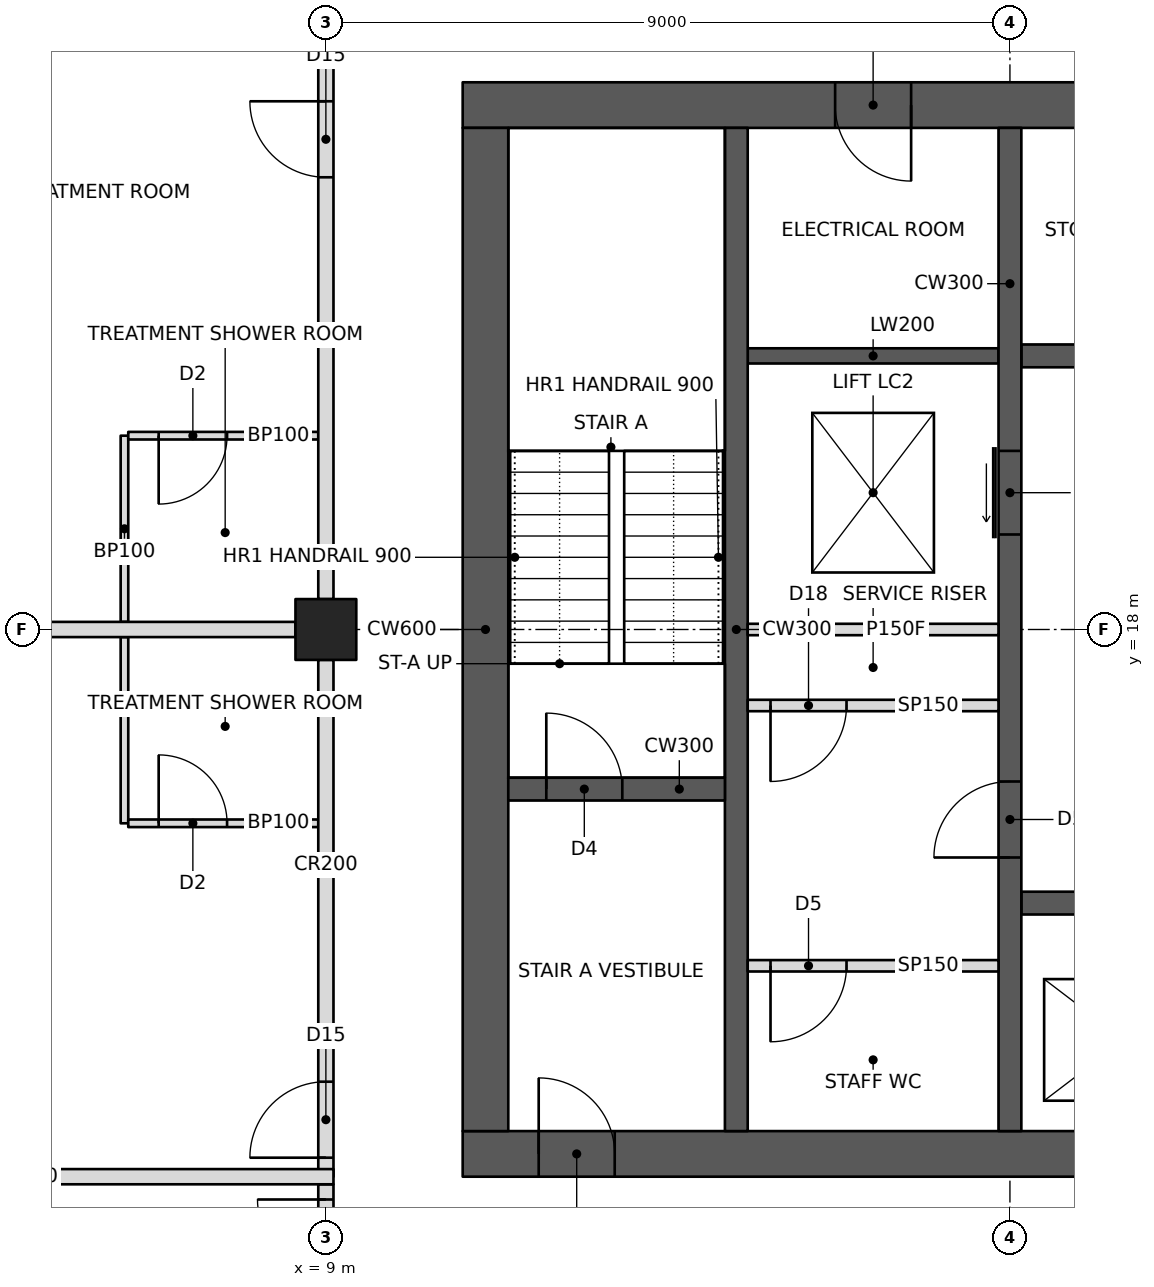
"""IFC4 building model, lengths in metres.
Left out: names, types, materials, properties, quantities, classifications, styles, units other than length and angle.
Written with IfcOpenShell. Run it as: python <this file> out.ifc"""

import sys

from ifc_helpers import new_model, si_unit, direction, frame, frame_2d, origin, origin_2d, place, context, subcontext, project, spatial, rectangle, hollow_rectangle, extrude, element, fill, save


model = new_model("IFC4")
c1 = context("Model", 3, precision=1e-05, world=origin(), true_north=direction((0.0, 1.0)))
c2 = subcontext(c1, "Body", "Model", "MODEL_VIEW")
j1 = project(units=[si_unit("LENGTHUNIT", "METRE"), si_unit("PLANEANGLEUNIT", "RADIAN")], contexts=[c1])
p1 = place(None, origin())
s1 = spatial("IfcSite", under=j1, at=p1, CompositionType="ELEMENT")
p2 = place(p1, origin())
s2 = spatial("IfcBuilding", under=s1, at=p2, CompositionType="ELEMENT")
p3 = place(p2, frame((0.0, 0.0, 266.2)))
s3 = spatial("IfcBuildingStorey", under=s2, at=p3, CompositionType="ELEMENT", Elevation=266.2)
p4 = place(p3, frame((9.0, 18.0, 0.0), z_axis=(0.0, 0.0, 1.0), x_axis=(1.0, 0.0, 0.0)))
e1 = element("IfcColumn", 1, at=p4, inside=s3, PredefinedType="COLUMN", context=c2, shape_type="SweptSolid", body=[
    extrude(hollow_rectangle(XDim=0.8, YDim=0.8, WallThickness=0.032, at=origin_2d()), origin(), (0.0, 0.0, 1.0), 3.6),
])
p5 = place(p3, frame((10.8, 11.1, 0.0), z_axis=(0.0, 0.0, 1.0), x_axis=(1.0, 0.0, 0.0)))
e2 = element("IfcWall", 2, at=p5, inside=s3, PredefinedType="SHEAR", context=c2, shape_type="SweptSolid", body=[
    extrude(rectangle(XDim=23.4, YDim=0.6, at=frame_2d((11.7, 0.0))), origin(), (0.0, 0.0, 1.0), 3.6),
])
p6 = place(p5, frame((1.0, 0.0, 0.0)))
e3 = element("IfcOpeningElement", 3, at=p6, cuts=e2, PredefinedType="OPENING", context=c2, shape_type="SweptSolid", body=[
    extrude(rectangle(XDim=1.0, YDim=2.1, at=frame_2d((0.5, 1.05))), frame((0.0, 0.31, 0.0), z_axis=(0.0, -1.0, 0.0), x_axis=(1.0, 0.0, 0.0)), (0.0, 0.0, 1.0), 0.62),
])
p7 = place(p5, frame((17.2, 0.0, 0.0)))
e4 = element("IfcOpeningElement", 4, at=p7, cuts=e2, PredefinedType="OPENING", context=c2, shape_type="SweptSolid", body=[
    extrude(rectangle(XDim=1.8, YDim=2.1, at=frame_2d((0.9, 1.05))), frame((0.0, 0.31, 0.0), z_axis=(0.0, -1.0, 0.0), x_axis=(1.0, 0.0, 0.0)), (0.0, 0.0, 1.0), 0.62),
])
p8 = place(p3, frame((10.8, 24.9, 0.0), z_axis=(0.0, 0.0, 1.0), x_axis=(1.0, 0.0, 0.0)))
e5 = element("IfcWall", 5, at=p8, inside=s3, PredefinedType="SHEAR", context=c2, shape_type="SweptSolid", body=[
    extrude(rectangle(XDim=23.4, YDim=0.6, at=frame_2d((11.7, 0.0))), origin(), (0.0, 0.0, 1.0), 3.6),
])
p9 = place(p8, frame((17.2, 0.0, 0.0)))
e6 = element("IfcOpeningElement", 6, at=p9, cuts=e5, PredefinedType="OPENING", context=c2, shape_type="SweptSolid", body=[
    extrude(rectangle(XDim=1.8, YDim=2.1, at=frame_2d((0.9, 1.05))), frame((0.0, 0.31, 0.0), z_axis=(0.0, -1.0, 0.0), x_axis=(1.0, 0.0, 0.0)), (0.0, 0.0, 1.0), 0.62),
])
p10 = place(p8, frame((21.1, 0.0, 0.0)))
e7 = element("IfcOpeningElement", 7, at=p10, cuts=e5, PredefinedType="OPENING", context=c2, shape_type="SweptSolid", body=[
    extrude(rectangle(XDim=1.0, YDim=2.1, at=frame_2d((0.5, 1.05))), frame((0.0, 0.31, 0.0), z_axis=(0.0, -1.0, 0.0), x_axis=(1.0, 0.0, 0.0)), (0.0, 0.0, 1.0), 0.62),
])
p11 = place(p8, frame((4.9, 0.0, 0.0)))
e8 = element("IfcOpeningElement", 8, at=p11, cuts=e5, PredefinedType="OPENING", context=c2, shape_type="SweptSolid", body=[
    extrude(rectangle(XDim=1.0, YDim=2.1, at=frame_2d((0.5, 1.05))), frame((0.0, 0.31, 0.0), z_axis=(0.0, -1.0, 0.0), x_axis=(1.0, 0.0, 0.0)), (0.0, 0.0, 1.0), 0.62),
])
p12 = place(p3, frame((11.1, 11.4, 0.0), z_axis=(0.0, 0.0, 1.0), x_axis=(0.0, 1.0, 0.0)))
e9 = element("IfcWall", 9, at=p12, inside=s3, PredefinedType="SHEAR", context=c2, shape_type="SweptSolid", body=[
    extrude(rectangle(XDim=13.2, YDim=0.6, at=frame_2d((6.6, 0.0))), origin(), (0.0, 0.0, 1.0), 3.6),
])
p13 = place(p3, frame((14.4, 11.4, 0.0), z_axis=(0.0, 0.0, 1.0), x_axis=(0.0, 1.0, 0.0)))
e10 = element("IfcWall", 10, at=p13, inside=s3, PredefinedType="SHEAR", context=c2, shape_type="SweptSolid", body=[
    extrude(rectangle(XDim=13.2, YDim=0.3, at=frame_2d((6.6, 0.0))), origin(), (0.0, 0.0, 1.0), 3.6),
])
p14 = place(p3, frame((11.4, 15.9, 0.0), z_axis=(0.0, 0.0, 1.0), x_axis=(1.0, 0.0, 0.0)))
e11 = element("IfcWall", 11, at=p14, inside=s3, PredefinedType="SHEAR", context=c2, shape_type="SweptSolid", body=[
    extrude(rectangle(XDim=2.85, YDim=0.3, at=frame_2d((1.425, 0.0))), origin(), (0.0, 0.0, 1.0), 3.6),
])
p15 = place(p14, frame((0.5, 0.0, 0.0)))
e12 = element("IfcOpeningElement", 12, at=p15, cuts=e11, PredefinedType="OPENING", context=c2, shape_type="SweptSolid", body=[
    extrude(rectangle(XDim=1.0, YDim=2.1, at=frame_2d((0.5, 1.05))), frame((0.0, 0.16, 0.0), z_axis=(0.0, -1.0, 0.0), x_axis=(1.0, 0.0, 0.0)), (0.0, 0.0, 1.0), 0.32),
])
p16 = place(p3, frame((18.0, 11.4, 0.0), z_axis=(0.0, 0.0, 1.0), x_axis=(0.0, 1.0, 0.0)))
e13 = element("IfcWall", 13, at=p16, inside=s3, PredefinedType="SHEAR", context=c2, shape_type="SweptSolid", body=[
    extrude(rectangle(XDim=13.2, YDim=0.3, at=frame_2d((6.6, 0.0))), origin(), (0.0, 0.0, 1.0), 3.6),
])
p17 = place(p16, frame((3.6, 0.0, 0.0)))
e14 = element("IfcOpeningElement", 14, at=p17, cuts=e13, PredefinedType="OPENING", context=c2, shape_type="SweptSolid", body=[
    extrude(rectangle(XDim=1.0, YDim=2.1, at=frame_2d((0.5, 1.05))), frame((0.0, 0.16, 0.0), z_axis=(0.0, -1.0, 0.0), x_axis=(1.0, 0.0, 0.0)), (0.0, 0.0, 1.0), 0.32),
])
p18 = place(p16, frame((7.85, 0.0, 0.0)))
e15 = element("IfcOpeningElement", 15, at=p18, cuts=e13, PredefinedType="OPENING", context=c2, shape_type="SweptSolid", body=[
    extrude(rectangle(XDim=1.1, YDim=2.1, at=frame_2d((0.55, 1.05))), frame((0.0, 0.16, 0.0), z_axis=(0.0, -1.0, 0.0), x_axis=(1.0, 0.0, 0.0)), (0.0, 0.0, 1.0), 0.32),
])
p19 = place(p3, frame((14.55, 18.0, 0.0), z_axis=(0.0, 0.0, 1.0), x_axis=(1.0, 0.0, 0.0)))
e16 = element("IfcWall", 16, at=p19, inside=s3, PredefinedType="PARTITIONING", context=c2, shape_type="SweptSolid", body=[
    extrude(rectangle(XDim=3.3, YDim=0.15, at=frame_2d((1.65, 0.0))), origin(), (0.0, 0.0, 1.0), 3.35),
])
p20 = place(p3, frame((18.15, 14.4, 0.0), z_axis=(0.0, 0.0, 1.0), x_axis=(1.0, 0.0, 0.0)))
e17 = element("IfcWall", 17, at=p20, inside=s3, PredefinedType="SHEAR", context=c2, shape_type="SweptSolid", body=[
    extrude(rectangle(XDim=9.0, YDim=0.3, at=frame_2d((4.5, 0.0))), origin(), (0.0, 0.0, 1.0), 3.6),
])
p21 = place(p20, frame((0.8, 0.0, 0.0)))
e18 = element("IfcOpeningElement", 18, at=p21, cuts=e17, PredefinedType="OPENING", context=c2, shape_type="SweptSolid", body=[
    extrude(rectangle(XDim=1.1, YDim=2.1, at=frame_2d((0.55, 1.05))), frame((0.0, 0.16, 0.0), z_axis=(0.0, -1.0, 0.0), x_axis=(1.0, 0.0, 0.0)), (0.0, 0.0, 1.0), 0.32),
])
p22 = place(p20, frame((6.75, 0.0, 0.0)))
e19 = element("IfcOpeningElement", 19, at=p22, cuts=e17, PredefinedType="OPENING", context=c2, shape_type="SweptSolid", body=[
    extrude(rectangle(XDim=1.2, YDim=2.1, at=frame_2d((0.6, 1.05))), frame((0.0, 0.16, 0.0), z_axis=(0.0, -1.0, 0.0), x_axis=(1.0, 0.0, 0.0)), (0.0, 0.0, 1.0), 0.32),
])
p23 = place(p20, frame((3.8, 0.0, 0.0)))
e20 = element("IfcOpeningElement", 20, at=p23, cuts=e17, PredefinedType="OPENING", context=c2, shape_type="SweptSolid", body=[
    extrude(rectangle(XDim=1.1, YDim=2.1, at=frame_2d((0.55, 1.05))), frame((0.0, 0.16, 0.0), z_axis=(0.0, -1.0, 0.0), x_axis=(1.0, 0.0, 0.0)), (0.0, 0.0, 1.0), 0.32),
])
p24 = place(p3, frame((18.15, 21.6, 0.0), z_axis=(0.0, 0.0, 1.0), x_axis=(1.0, 0.0, 0.0)))
e21 = element("IfcWall", 21, at=p24, inside=s3, PredefinedType="SHEAR", context=c2, shape_type="SweptSolid", body=[
    extrude(rectangle(XDim=9.0, YDim=0.3, at=frame_2d((4.5, 0.0))), origin(), (0.0, 0.0, 1.0), 3.6),
])
p25 = place(p24, frame((6.75, 0.0, 0.0)))
e22 = element("IfcOpeningElement", 22, at=p25, cuts=e21, PredefinedType="OPENING", context=c2, shape_type="SweptSolid", body=[
    extrude(rectangle(XDim=1.2, YDim=2.1, at=frame_2d((0.6, 1.05))), frame((0.0, 0.16, 0.0), z_axis=(0.0, -1.0, 0.0), x_axis=(1.0, 0.0, 0.0)), (0.0, 0.0, 1.0), 0.32),
])
p26 = place(p24, frame((0.8, 0.0, 0.0)))
e23 = element("IfcOpeningElement", 23, at=p26, cuts=e21, PredefinedType="OPENING", context=c2, shape_type="SweptSolid", body=[
    extrude(rectangle(XDim=1.1, YDim=2.1, at=frame_2d((0.55, 1.05))), frame((0.0, 0.16, 0.0), z_axis=(0.0, -1.0, 0.0), x_axis=(1.0, 0.0, 0.0)), (0.0, 0.0, 1.0), 0.32),
])
p27 = place(p24, frame((3.8, 0.0, 0.0)))
e24 = element("IfcOpeningElement", 24, at=p27, cuts=e21, PredefinedType="OPENING", context=c2, shape_type="SweptSolid", body=[
    extrude(rectangle(XDim=1.1, YDim=2.1, at=frame_2d((0.55, 1.05))), frame((0.0, 0.16, 0.0), z_axis=(0.0, -1.0, 0.0), x_axis=(1.0, 0.0, 0.0)), (0.0, 0.0, 1.0), 0.32),
])
p28 = place(p3, frame((14.55, 21.6, 0.0), z_axis=(0.0, 0.0, 1.0), x_axis=(1.0, 0.0, 0.0)))
e25 = element("IfcWall", 25, at=p28, inside=s3, PredefinedType="SHEAR", context=c2, shape_type="SweptSolid", body=[
    extrude(rectangle(XDim=3.3, YDim=0.2, at=frame_2d((1.65, 0.0))), origin(), (0.0, 0.0, 1.0), 3.6),
])
p29 = place(p3, frame((9.0, 10.8, 0.0), z_axis=(0.0, 0.0, 1.0), x_axis=(0.0, 1.0, 0.0)))
e26 = element("IfcWall", 26, at=p29, inside=s3, PredefinedType="PARTITIONING", context=c2, shape_type="SweptSolid", body=[
    extrude(rectangle(XDim=6.8, YDim=0.2, at=frame_2d((3.4, 0.0))), origin(), (0.0, 0.0, 1.0), 2.491),
])
p30 = place(p29, frame((0.25, 0.0, 0.0)))
e27 = element("IfcOpeningElement", 27, at=p30, cuts=e26, PredefinedType="OPENING", context=c2, shape_type="SweptSolid", body=[
    extrude(rectangle(XDim=1.0, YDim=2.1, at=frame_2d((0.5, 1.05))), frame((0.0, 0.11, 0.0), z_axis=(0.0, -1.0, 0.0), x_axis=(1.0, 0.0, 0.0)), (0.0, 0.0, 1.0), 0.22),
])
p31 = place(p3, frame((9.0, 18.4, 0.0), z_axis=(0.0, 0.0, 1.0), x_axis=(0.0, 1.0, 0.0)))
e28 = element("IfcWall", 28, at=p31, inside=s3, PredefinedType="PARTITIONING", context=c2, shape_type="SweptSolid", body=[
    extrude(rectangle(XDim=8.2, YDim=0.2, at=frame_2d((4.1, 0.0))), origin(), (0.0, 0.0, 1.0), 2.491),
])
p32 = place(p31, frame((5.55, 0.0, 0.0)))
e29 = element("IfcOpeningElement", 29, at=p32, cuts=e28, PredefinedType="OPENING", context=c2, shape_type="SweptSolid", body=[
    extrude(rectangle(XDim=1.0, YDim=2.1, at=frame_2d((0.5, 1.05))), frame((0.0, 0.11, 0.0), z_axis=(0.0, -1.0, 0.0), x_axis=(1.0, 0.0, 0.0)), (0.0, 0.0, 1.0), 0.22),
])
p33 = place(p3, frame((1.0, 10.8, 0.0), z_axis=(0.0, 0.0, 1.0), x_axis=(1.0, 0.0, 0.0)))
e30 = element("IfcWall", 30, at=p33, inside=s3, PredefinedType="PARTITIONING", context=c2, shape_type="SweptSolid", body=[
    extrude(rectangle(XDim=8.1, YDim=0.2, at=frame_2d((4.05, 0.0))), origin(), (0.0, 0.0, 1.0), 2.491),
])
p34 = place(p3, frame((8.6, 18.0, 0.0), z_axis=(0.0, 0.0, 1.0), x_axis=(-1.0, 0.0, 0.0)))
e31 = element("IfcWall", 31, at=p34, inside=s3, PredefinedType="PARTITIONING", context=c2, shape_type="SweptSolid", body=[
    extrude(rectangle(XDim=7.6, YDim=0.2, at=frame_2d((3.8, 0.0))), origin(), (0.0, 0.0, 1.0), 2.491),
])
p35 = place(p3, frame((6.35, 15.45, 0.0), z_axis=(0.0, 0.0, 1.0), x_axis=(0.0, 1.0, 0.0)))
e32 = element("IfcWall", 32, at=p35, inside=s3, PredefinedType="PARTITIONING", context=c2, shape_type="SweptSolid", body=[
    extrude(rectangle(XDim=2.45, YDim=0.1, at=frame_2d((1.225, 0.0))), origin(), (0.0, 0.0, 1.0), 2.491),
])
p36 = place(p3, frame((8.9, 15.45, 0.0), z_axis=(0.0, 0.0, 1.0), x_axis=(-1.0, 0.0, 0.0)))
e33 = element("IfcWall", 33, at=p36, inside=s3, PredefinedType="PARTITIONING", context=c2, shape_type="SweptSolid", body=[
    extrude(rectangle(XDim=2.5, YDim=0.1, at=frame_2d((1.25, 0.0))), origin(), (0.0, 0.0, 1.0), 2.491),
])
p37 = place(p36, frame((1.2, 0.0, 0.0)))
e34 = element("IfcOpeningElement", 34, at=p37, cuts=e33, PredefinedType="OPENING", context=c2, shape_type="SweptSolid", body=[
    extrude(rectangle(XDim=0.9, YDim=2.1, at=frame_2d((0.45, 1.05))), frame((0.0, 0.06, 0.0), z_axis=(0.0, -1.0, 0.0), x_axis=(1.0, 0.0, 0.0)), (0.0, 0.0, 1.0), 0.12),
])
p38 = place(p3, frame((6.35, 18.1, 0.0), z_axis=(0.0, 0.0, 1.0), x_axis=(0.0, 1.0, 0.0)))
e35 = element("IfcWall", 35, at=p38, inside=s3, PredefinedType="PARTITIONING", context=c2, shape_type="SweptSolid", body=[
    extrude(rectangle(XDim=2.45, YDim=0.1, at=frame_2d((1.225, 0.0))), origin(), (0.0, 0.0, 1.0), 2.491),
])
p39 = place(p3, frame((8.9, 20.55, 0.0), z_axis=(0.0, 0.0, 1.0), x_axis=(-1.0, 0.0, 0.0)))
e36 = element("IfcWall", 36, at=p39, inside=s3, PredefinedType="PARTITIONING", context=c2, shape_type="SweptSolid", body=[
    extrude(rectangle(XDim=2.5, YDim=0.1, at=frame_2d((1.25, 0.0))), origin(), (0.0, 0.0, 1.0), 2.491),
])
p40 = place(p39, frame((1.2, 0.0, 0.0)))
e37 = element("IfcOpeningElement", 37, at=p40, cuts=e36, PredefinedType="OPENING", context=c2, shape_type="SweptSolid", body=[
    extrude(rectangle(XDim=0.9, YDim=2.1, at=frame_2d((0.45, 1.05))), frame((0.0, 0.06, 0.0), z_axis=(0.0, -1.0, 0.0), x_axis=(1.0, 0.0, 0.0)), (0.0, 0.0, 1.0), 0.12),
])
p41 = place(p3, frame((9.0, 9.4, 0.0), z_axis=(0.0, 0.0, 1.0), x_axis=(0.0, 1.0, 0.0)))
e38 = element("IfcWall", 38, at=p41, inside=s3, PredefinedType="PARTITIONING", context=c2, shape_type="SweptSolid", body=[
    extrude(rectangle(XDim=1.3, YDim=0.2, at=frame_2d((0.65, 0.0))), origin(), (0.0, 0.0, 1.0), 2.491),
])
p42 = place(p41, frame((0.2, 0.0, 0.0)))
e39 = element("IfcOpeningElement", 39, at=p42, cuts=e38, PredefinedType="OPENING", context=c2, shape_type="SweptSolid", body=[
    extrude(rectangle(XDim=0.9, YDim=2.1, at=frame_2d((0.45, 1.05))), frame((0.0, 0.11, 0.0), z_axis=(0.0, -1.0, 0.0), x_axis=(1.0, 0.0, 0.0)), (0.0, 0.0, 1.0), 0.22),
])
p43 = place(p3, frame((14.55, 17.0, 0.0), z_axis=(0.0, 0.0, 1.0), x_axis=(1.0, 0.0, 0.0)))
e40 = element("IfcWall", 40, at=p43, inside=s3, PredefinedType="PARTITIONING", context=c2, shape_type="SweptSolid", body=[
    extrude(rectangle(XDim=3.3, YDim=0.15, at=frame_2d((1.65, 0.0))), origin(), (0.0, 0.0, 1.0), 3.35),
])
p44 = place(p43, frame((0.3, 0.0, 0.0)))
e41 = element("IfcOpeningElement", 41, at=p44, cuts=e40, PredefinedType="OPENING", context=c2, shape_type="SweptSolid", body=[
    extrude(rectangle(XDim=1.0, YDim=2.1, at=frame_2d((0.5, 1.05))), frame((0.0, 0.085, 0.0), z_axis=(0.0, -1.0, 0.0), x_axis=(1.0, 0.0, 0.0)), (0.0, 0.0, 1.0), 0.17),
])
p45 = place(p3, frame((14.55, 13.575, 0.0), z_axis=(0.0, 0.0, 1.0), x_axis=(1.0, 0.0, 0.0)))
e42 = element("IfcWall", 42, at=p45, inside=s3, PredefinedType="PARTITIONING", context=c2, shape_type="SweptSolid", body=[
    extrude(rectangle(XDim=3.3, YDim=0.15, at=frame_2d((1.65, 0.0))), origin(), (0.0, 0.0, 1.0), 3.35),
])
p46 = place(p45, frame((0.3, 0.0, 0.0)))
e43 = element("IfcOpeningElement", 43, at=p46, cuts=e42, PredefinedType="OPENING", context=c2, shape_type="SweptSolid", body=[
    extrude(rectangle(XDim=1.0, YDim=2.1, at=frame_2d((0.5, 1.05))), frame((0.0, 0.085, 0.0), z_axis=(0.0, -1.0, 0.0), x_axis=(1.0, 0.0, 0.0)), (0.0, 0.0, 1.0), 0.17),
])
p47 = place(p37, frame((0.9, 0.0, 0.0), z_axis=(0.0, 0.0, 1.0), x_axis=(-1.0, 0.0, 0.0)))
e44 = element("IfcDoor", 44, at=p47, inside=s3, OperationType="SINGLE_SWING_LEFT", PredefinedType="DOOR", context=c2, shape_type="SweptSolid", body=[
    extrude(rectangle(XDim=0.9, YDim=2.1, at=frame_2d((0.45, 1.05))), frame((0.0, 0.025, 0.0), z_axis=(0.0, -1.0, 0.0), x_axis=(1.0, 0.0, 0.0)), (0.0, 0.0, 1.0), 0.05),
])
fill(e34, e44)
p48 = place(p30, origin())
e45 = element("IfcDoor", 45, at=p48, inside=s3, OperationType="SINGLE_SWING_LEFT", PredefinedType="DOOR", context=c2, shape_type="SweptSolid", body=[
    extrude(rectangle(XDim=1.0, YDim=2.1, at=frame_2d((0.5, 1.05))), frame((0.0, 0.025, 0.0), z_axis=(0.0, -1.0, 0.0), x_axis=(1.0, 0.0, 0.0)), (0.0, 0.0, 1.0), 0.05),
])
fill(e27, e45)
p49 = place(p40, origin())
e46 = element("IfcDoor", 46, at=p49, inside=s3, OperationType="SINGLE_SWING_RIGHT", PredefinedType="DOOR", context=c2, shape_type="SweptSolid", body=[
    extrude(rectangle(XDim=0.9, YDim=2.1, at=frame_2d((0.45, 1.05))), frame((0.0, 0.025, 0.0), z_axis=(0.0, -1.0, 0.0), x_axis=(1.0, 0.0, 0.0)), (0.0, 0.0, 1.0), 0.05),
])
fill(e37, e46)
p50 = place(p32, origin())
e47 = element("IfcDoor", 47, at=p50, inside=s3, OperationType="SINGLE_SWING_RIGHT", PredefinedType="DOOR", context=c2, shape_type="SweptSolid", body=[
    extrude(rectangle(XDim=1.0, YDim=2.1, at=frame_2d((0.5, 1.05))), frame((0.0, 0.025, 0.0), z_axis=(0.0, -1.0, 0.0), x_axis=(1.0, 0.0, 0.0)), (0.0, 0.0, 1.0), 0.05),
])
fill(e29, e47)
p51 = place(p42, origin())
e48 = element("IfcDoor", 48, at=p51, inside=s3, OperationType="SINGLE_SWING_RIGHT", PredefinedType="DOOR", context=c2, shape_type="SweptSolid", body=[
    extrude(rectangle(XDim=0.9, YDim=2.1, at=frame_2d((0.45, 1.05))), frame((0.0, 0.025, 0.0), z_axis=(0.0, -1.0, 0.0), x_axis=(1.0, 0.0, 0.0)), (0.0, 0.0, 1.0), 0.05),
])
fill(e39, e48)
p52 = place(p44, frame((1.0, 0.0, 0.0), z_axis=(0.0, 0.0, 1.0), x_axis=(-1.0, 0.0, 0.0)))
e49 = element("IfcDoor", 49, at=p52, inside=s3, OperationType="SINGLE_SWING_RIGHT", PredefinedType="DOOR", context=c2, shape_type="SweptSolid", body=[
    extrude(rectangle(XDim=1.0, YDim=2.1, at=frame_2d((0.5, 1.05))), frame((0.0, 0.025, 0.0), z_axis=(0.0, -1.0, 0.0), x_axis=(1.0, 0.0, 0.0)), (0.0, 0.0, 1.0), 0.05),
])
fill(e41, e49)
p53 = place(p46, frame((1.0, 0.0, 0.0), z_axis=(0.0, 0.0, 1.0), x_axis=(-1.0, 0.0, 0.0)))
e50 = element("IfcDoor", 50, at=p53, inside=s3, OperationType="SINGLE_SWING_RIGHT", PredefinedType="DOOR", context=c2, shape_type="SweptSolid", body=[
    extrude(rectangle(XDim=1.0, YDim=2.1, at=frame_2d((0.5, 1.05))), frame((0.0, 0.025, 0.0), z_axis=(0.0, -1.0, 0.0), x_axis=(1.0, 0.0, 0.0)), (0.0, 0.0, 1.0), 0.05),
])
fill(e43, e50)
p54 = place(p6, origin())
e51 = element("IfcDoor", 51, at=p54, inside=s3, OperationType="SINGLE_SWING_LEFT", PredefinedType="DOOR", context=c2, shape_type="SweptSolid", body=[
    extrude(rectangle(XDim=1.0, YDim=2.1, at=frame_2d((0.5, 1.05))), frame((0.0, 0.025, 0.0), z_axis=(0.0, -1.0, 0.0), x_axis=(1.0, 0.0, 0.0)), (0.0, 0.0, 1.0), 0.05),
])
fill(e3, e51)
p55 = place(p15, origin())
e52 = element("IfcDoor", 52, at=p55, inside=s3, OperationType="SINGLE_SWING_LEFT", PredefinedType="DOOR", context=c2, shape_type="SweptSolid", body=[
    extrude(rectangle(XDim=1.0, YDim=2.1, at=frame_2d((0.5, 1.05))), frame((0.0, 0.025, 0.0), z_axis=(0.0, -1.0, 0.0), x_axis=(1.0, 0.0, 0.0)), (0.0, 0.0, 1.0), 0.05),
])
fill(e12, e52)
p56 = place(p17, origin())
e53 = element("IfcDoor", 53, at=p56, inside=s3, OperationType="SINGLE_SWING_LEFT", PredefinedType="DOOR", context=c2, shape_type="SweptSolid", body=[
    extrude(rectangle(XDim=1.0, YDim=2.1, at=frame_2d((0.5, 1.05))), frame((0.0, 0.025, 0.0), z_axis=(0.0, -1.0, 0.0), x_axis=(1.0, 0.0, 0.0)), (0.0, 0.0, 1.0), 0.05),
])
fill(e14, e53)
p57 = place(p11, frame((1.0, 0.0, 0.0), z_axis=(0.0, 0.0, 1.0), x_axis=(-1.0, 0.0, 0.0)))
e54 = element("IfcDoor", 54, at=p57, inside=s3, OperationType="SINGLE_SWING_LEFT", PredefinedType="DOOR", context=c2, shape_type="SweptSolid", body=[
    extrude(rectangle(XDim=1.0, YDim=2.1, at=frame_2d((0.5, 1.05))), frame((0.0, 0.025, 0.0), z_axis=(0.0, -1.0, 0.0), x_axis=(1.0, 0.0, 0.0)), (0.0, 0.0, 1.0), 0.05),
])
fill(e8, e54)
p58 = place(p18, origin())
e55 = element("IfcDoor", 55, at=p58, inside=s3, OperationType="SLIDING_TO_LEFT", PredefinedType="DOOR", context=c2, shape_type="SweptSolid", body=[
    extrude(rectangle(XDim=1.1, YDim=2.1, at=frame_2d((0.55, 1.05))), frame((0.0, 0.025, 0.0), z_axis=(0.0, -1.0, 0.0), x_axis=(1.0, 0.0, 0.0)), (0.0, 0.0, 1.0), 0.05),
])
fill(e15, e55)
save(model, sys.argv[1])
